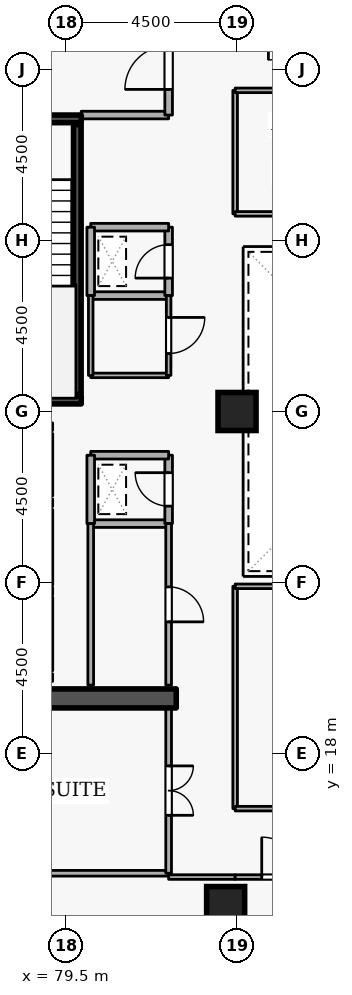
"""IFC4 building model, lengths in metres.
Left out: names, types, materials, properties, quantities, classifications, styles, units other than length and angle.
Written with IfcOpenShell. Run it as: python <this file> out.ifc"""

import sys

from ifc_helpers import new_model, si_unit, direction, frame, frame_2d, origin, origin_2d, place, context, subcontext, project, spatial, rectangle, extrude, element, fill, save


model = new_model("IFC4")
c1 = context("Model", 3, precision=1e-05, world=origin(), true_north=direction((0.0, 1.0)))
c2 = subcontext(c1, "Body", "Model", "MODEL_VIEW")
j1 = project(units=[si_unit("LENGTHUNIT", "METRE"), si_unit("PLANEANGLEUNIT", "RADIAN")], contexts=[c1])
p1 = place(None, origin())
s1 = spatial("IfcSite", under=j1, at=p1, CompositionType="ELEMENT")
p2 = place(p1, origin())
s2 = spatial("IfcBuilding", under=s1, at=p2, CompositionType="ELEMENT")
p3 = place(p2, frame((0.0, 0.0, 236.7)))
s3 = spatial("IfcBuildingStorey", under=s2, at=p3, CompositionType="ELEMENT", Elevation=236.7)
p4 = place(p3, frame((76.6, 19.45, 0.0), z_axis=(0.0, 0.0, 1.0), x_axis=(1.0, 0.0, 0.0)))
e1 = element("IfcWall", 1, at=p4, inside=s3, PredefinedType="SHEAR", context=c2, shape_type="SweptSolid", body=[
    extrude(rectangle(XDim=5.8, YDim=0.5, at=frame_2d((2.9, 0.0))), origin(), (0.0, 0.0, 1.0), 3.6),
])
for number, where, z_axis, x_axis in (
    (2, (83.7, 14.0, 0.0), (0.0, 0.0, 1.0), (1.0, 0.0, 0.0)),
    (3, (84.0, 27.0, 0.0), (0.0, 0.0, 1.0), (1.0, 0.0, 0.0)),
):
    element("IfcColumn", number, at=place(p3, frame(where, z_axis=z_axis, x_axis=x_axis)), inside=s3, PredefinedType="COLUMN", context=c2, shape_type="SweptSolid", body=[
        extrude(rectangle(XDim=1.0, YDim=1.0, at=origin_2d()), origin(), (0.0, 0.0, 1.0), 3.6),
    ])
p5 = place(p3, frame((79.05, 24.78, 0.0), z_axis=(0.0, 0.0, 1.0), x_axis=(0.0, 1.0, 0.0)))
e4 = element("IfcWall", 4, at=p5, inside=s3, PredefinedType="STANDARD", context=c2, shape_type="SweptSolid", body=[
    extrude(rectangle(XDim=1.64, YDim=0.2, at=frame_2d((0.82, 0.0))), origin(), (0.0, 0.0, 1.0), 3.34),
])
p6 = place(p5, frame((0.31, 0.0, 0.0)))
e5 = element("IfcOpeningElement", 5, at=p6, cuts=e4, PredefinedType="OPENING", context=c2, shape_type="SweptSolid", body=[
    extrude(rectangle(XDim=1.02, YDim=2.06, at=frame_2d((0.51, 1.03))), frame((0.0, 0.11, 0.0), z_axis=(0.0, -1.0, 0.0), x_axis=(1.0, 0.0, 0.0)), (0.0, 0.0, 1.0), 0.22),
])
p7 = place(p3, frame((79.05, 22.43, 0.0), z_axis=(0.0, 0.0, 1.0), x_axis=(0.0, 1.0, 0.0)))
e6 = element("IfcWall", 6, at=p7, inside=s3, PredefinedType="STANDARD", context=c2, shape_type="SweptSolid", body=[
    extrude(rectangle(XDim=1.99, YDim=0.2, at=frame_2d((0.995, 0.0))), origin(), (0.0, 0.0, 1.0), 3.34),
])
p8 = place(p7, frame((0.485, 0.0, 0.0)))
e7 = element("IfcOpeningElement", 7, at=p8, cuts=e6, PredefinedType="OPENING", context=c2, shape_type="SweptSolid", body=[
    extrude(rectangle(XDim=1.02, YDim=2.06, at=frame_2d((0.51, 1.03))), frame((0.0, 0.11, 0.0), z_axis=(0.0, -1.0, 0.0), x_axis=(1.0, 0.0, 0.0)), (0.0, 0.0, 1.0), 0.22),
])
p9 = place(p3, frame((79.05, 20.18, 0.0), z_axis=(0.0, 0.0, 1.0), x_axis=(0.0, 1.0, 0.0)))
e8 = element("IfcWall", 8, at=p9, inside=s3, PredefinedType="STANDARD", context=c2, shape_type="SweptSolid", body=[
    extrude(rectangle(XDim=1.94, YDim=0.2, at=frame_2d((0.97, 0.0))), origin(), (0.0, 0.0, 1.0), 3.34),
])
p10 = place(p9, frame((0.46, 0.0, 0.0)))
e9 = element("IfcOpeningElement", 9, at=p10, cuts=e8, PredefinedType="OPENING", context=c2, shape_type="SweptSolid", body=[
    extrude(rectangle(XDim=1.02, YDim=2.06, at=frame_2d((0.51, 1.03))), frame((0.0, 0.11, 0.0), z_axis=(0.0, -1.0, 0.0), x_axis=(1.0, 0.0, 0.0)), (0.0, 0.0, 1.0), 0.22),
])
p11 = place(p3, frame((76.55, 34.7, 0.0), z_axis=(0.0, 0.0, 1.0), x_axis=(1.0, 0.0, 0.0)))
e10 = element("IfcWall", 10, at=p11, inside=s3, PredefinedType="SHEAR", context=c2, shape_type="SweptSolid", body=[
    extrude(rectangle(XDim=3.35, YDim=0.2, at=frame_2d((1.675, 0.0))), origin(), (0.0, 0.0, 1.0), 3.6),
])
p12 = place(p11, frame((1.125, 0.0, 0.0)))
e11 = element("IfcOpeningElement", 11, at=p12, cuts=e10, PredefinedType="OPENING", context=c2, shape_type="SweptSolid", body=[
    extrude(rectangle(XDim=1.1, YDim=2.1, at=frame_2d((0.55, 1.05))), frame((0.0, 0.11, 0.0), z_axis=(0.0, -1.0, 0.0), x_axis=(1.0, 0.0, 0.0)), (0.0, 0.0, 1.0), 0.22),
])
p13 = place(p3, frame((79.9, 27.3, 0.0), z_axis=(0.0, 0.0, 1.0), x_axis=(-1.0, 0.0, 0.0)))
e12 = element("IfcWall", 12, at=p13, inside=s3, PredefinedType="SHEAR", context=c2, shape_type="SweptSolid", body=[
    extrude(rectangle(XDim=3.35, YDim=0.2, at=frame_2d((1.675, 0.0))), origin(), (0.0, 0.0, 1.0), 3.6),
])
p14 = place(p3, frame((79.797, 27.45, 0.0), z_axis=(0.0, 0.0, 1.0), x_axis=(0.0, 1.0, 0.0)))
e13 = element("IfcWall", 13, at=p14, inside=s3, PredefinedType="SHEAR", context=c2, shape_type="SweptSolid", body=[
    extrude(rectangle(XDim=7.1, YDim=0.2, at=frame_2d((3.55, 0.0))), origin(), (0.0, 0.0, 1.0), 3.6),
])
p15 = place(p3, frame((79.9, 34.8, 0.0), z_axis=(0.0, 0.0, 1.0), x_axis=(1.0, 0.0, 0.0)))
e14 = element("IfcWall", 14, at=p15, inside=s3, PredefinedType="STANDARD", context=c2, shape_type="SweptSolid", body=[
    extrude(rectangle(XDim=2.3, YDim=0.2, at=frame_2d((1.15, 0.0))), origin(), (0.0, 0.0, 1.0), 2.545),
])
p16 = place(p3, frame((82.2, 34.8, 0.0), z_axis=(0.0, 0.0, 1.0), x_axis=(0.0, 1.0, 0.0)))
e15 = element("IfcWall", 15, at=p16, inside=s3, PredefinedType="STANDARD", context=c2, shape_type="SweptSolid", body=[
    extrude(rectangle(XDim=2.5, YDim=0.2, at=frame_2d((1.25, 0.0))), origin(), (0.0, 0.0, 1.0), 3.34),
])
p17 = place(p16, frame((0.675, 0.0, 0.0)))
e16 = element("IfcOpeningElement", 16, at=p17, cuts=e15, PredefinedType="OPENING", context=c2, shape_type="SweptSolid", body=[
    extrude(rectangle(XDim=1.15, YDim=2.1, at=frame_2d((0.575, 1.05))), frame((0.0, 0.11, 0.0), z_axis=(0.0, -1.0, 0.0), x_axis=(1.0, 0.0, 0.0)), (0.0, 0.0, 1.0), 0.22),
])
p18 = place(p3, frame((80.15, 24.05, 0.0), z_axis=(0.0, 0.0, 1.0), x_axis=(1.0, 0.0, 0.0)))
e17 = element("IfcWall", 17, at=p18, inside=s3, PredefinedType="STANDARD", context=c2, shape_type="SweptSolid", body=[
    extrude(rectangle(XDim=2.05, YDim=0.2, at=frame_2d((1.025, 0.0))), origin(), (0.0, 0.0, 1.0), 3.34),
])
p19 = place(p3, frame((82.2, 24.05, 0.0), z_axis=(0.0, 0.0, 1.0), x_axis=(0.0, 1.0, 0.0)))
e18 = element("IfcWall", 18, at=p19, inside=s3, PredefinedType="STANDARD", context=c2, shape_type="SweptSolid", body=[
    extrude(rectangle(XDim=1.8, YDim=0.2, at=frame_2d((0.9, 0.0))), origin(), (0.0, 0.0, 1.0), 3.34),
])
p20 = place(p19, frame((0.46, 0.0, 0.0)))
e19 = element("IfcOpeningElement", 19, at=p20, cuts=e18, PredefinedType="OPENING", context=c2, shape_type="SweptSolid", body=[
    extrude(rectangle(XDim=0.88, YDim=2.04, at=frame_2d((0.44, 1.02))), frame((0.0, 0.11, 0.0), z_axis=(0.0, -1.0, 0.0), x_axis=(1.0, 0.0, 0.0)), (0.0, 0.0, 1.0), 0.22),
])
p21 = place(p3, frame((82.2, 25.85, 0.0), z_axis=(0.0, 0.0, 1.0), x_axis=(-1.0, 0.0, 0.0)))
e20 = element("IfcWall", 20, at=p21, inside=s3, PredefinedType="STANDARD", context=c2, shape_type="SweptSolid", body=[
    extrude(rectangle(XDim=2.05, YDim=0.2, at=frame_2d((1.025, 0.0))), origin(), (0.0, 0.0, 1.0), 3.34),
])
p22 = place(p3, frame((80.15, 25.85, 0.0), z_axis=(0.0, 0.0, 1.0), x_axis=(0.0, -1.0, 0.0)))
e21 = element("IfcWall", 21, at=p22, inside=s3, PredefinedType="STANDARD", context=c2, shape_type="SweptSolid", body=[
    extrude(rectangle(XDim=1.8, YDim=0.2, at=frame_2d((0.9, 0.0))), origin(), (0.0, 0.0, 1.0), 3.34),
])
p23 = place(p3, frame((80.15, 30.05, 0.0), z_axis=(0.0, 0.0, 1.0), x_axis=(1.0, 0.0, 0.0)))
e22 = element("IfcWall", 22, at=p23, inside=s3, PredefinedType="STANDARD", context=c2, shape_type="SweptSolid", body=[
    extrude(rectangle(XDim=2.05, YDim=0.2, at=frame_2d((1.025, 0.0))), origin(), (0.0, 0.0, 1.0), 3.34),
])
p24 = place(p3, frame((82.2, 30.05, 0.0), z_axis=(0.0, 0.0, 1.0), x_axis=(0.0, 1.0, 0.0)))
e23 = element("IfcWall", 23, at=p24, inside=s3, PredefinedType="STANDARD", context=c2, shape_type="SweptSolid", body=[
    extrude(rectangle(XDim=1.8, YDim=0.2, at=frame_2d((0.9, 0.0))), origin(), (0.0, 0.0, 1.0), 3.34),
])
p25 = place(p24, frame((0.46, 0.0, 0.0)))
e24 = element("IfcOpeningElement", 24, at=p25, cuts=e23, PredefinedType="OPENING", context=c2, shape_type="SweptSolid", body=[
    extrude(rectangle(XDim=0.88, YDim=2.04, at=frame_2d((0.44, 1.02))), frame((0.0, 0.11, 0.0), z_axis=(0.0, -1.0, 0.0), x_axis=(1.0, 0.0, 0.0)), (0.0, 0.0, 1.0), 0.22),
])
p26 = place(p3, frame((82.2, 31.85, 0.0), z_axis=(0.0, 0.0, 1.0), x_axis=(-1.0, 0.0, 0.0)))
e25 = element("IfcWall", 25, at=p26, inside=s3, PredefinedType="STANDARD", context=c2, shape_type="SweptSolid", body=[
    extrude(rectangle(XDim=2.05, YDim=0.2, at=frame_2d((1.025, 0.0))), origin(), (0.0, 0.0, 1.0), 3.34),
])
p27 = place(p3, frame((80.15, 31.85, 0.0), z_axis=(0.0, 0.0, 1.0), x_axis=(0.0, -1.0, 0.0)))
e26 = element("IfcWall", 26, at=p27, inside=s3, PredefinedType="STANDARD", context=c2, shape_type="SweptSolid", body=[
    extrude(rectangle(XDim=1.8, YDim=0.2, at=frame_2d((0.9, 0.0))), origin(), (0.0, 0.0, 1.0), 3.34),
])
p28 = place(p3, frame((80.15, 19.8, 0.0), z_axis=(0.0, 0.0, 1.0), x_axis=(0.0, 1.0, 0.0)))
e27 = element("IfcWall", 27, at=p28, inside=s3, PredefinedType="PARTITIONING", context=c2, shape_type="SweptSolid", body=[
    extrude(rectangle(XDim=4.25, YDim=0.15, at=frame_2d((2.125, 0.0))), origin(), (0.0, 0.0, 1.0), 3.34),
])
p29 = place(p3, frame((82.2, 24.05, 0.0), z_axis=(0.0, 0.0, 1.0), x_axis=(0.0, -1.0, 0.0)))
e28 = element("IfcWall", 28, at=p29, inside=s3, PredefinedType="PARTITIONING", context=c2, shape_type="SweptSolid", body=[
    extrude(rectangle(XDim=4.25, YDim=0.15, at=frame_2d((2.125, 0.0))), origin(), (0.0, 0.0, 1.0), 3.34),
])
p30 = place(p29, frame((1.665, 0.0, 0.0)))
e29 = element("IfcOpeningElement", 29, at=p30, cuts=e28, PredefinedType="OPENING", context=c2, shape_type="SweptSolid", body=[
    extrude(rectangle(XDim=0.92, YDim=2.08, at=frame_2d((0.46, 1.04))), frame((0.0, 0.085, 0.0), z_axis=(0.0, -1.0, 0.0), x_axis=(1.0, 0.0, 0.0)), (0.0, 0.0, 1.0), 0.17),
])
p31 = place(p3, frame((82.2, 27.95, 0.0), z_axis=(0.0, 0.0, 1.0), x_axis=(-1.0, 0.0, 0.0)))
e30 = element("IfcWall", 30, at=p31, inside=s3, PredefinedType="PARTITIONING", context=c2, shape_type="SweptSolid", body=[
    extrude(rectangle(XDim=2.05, YDim=0.12, at=frame_2d((1.025, 0.0))), origin(), (0.0, 0.0, 1.0), 3.34),
])
p32 = place(p3, frame((80.15, 27.95, 0.0), z_axis=(0.0, 0.0, 1.0), x_axis=(0.0, 1.0, 0.0)))
e31 = element("IfcWall", 31, at=p32, inside=s3, PredefinedType="PARTITIONING", context=c2, shape_type="SweptSolid", body=[
    extrude(rectangle(XDim=2.1, YDim=0.12, at=frame_2d((1.05, 0.0))), origin(), (0.0, 0.0, 1.0), 3.34),
])
p33 = place(p3, frame((82.2, 30.05, 0.0), z_axis=(0.0, 0.0, 1.0), x_axis=(0.0, -1.0, 0.0)))
e32 = element("IfcWall", 32, at=p33, inside=s3, PredefinedType="PARTITIONING", context=c2, shape_type="SweptSolid", body=[
    extrude(rectangle(XDim=2.1, YDim=0.12, at=frame_2d((1.05, 0.0))), origin(), (0.0, 0.0, 1.0), 3.34),
])
p34 = place(p33, frame((0.575, 0.0, 0.0)))
e33 = element("IfcOpeningElement", 33, at=p34, cuts=e32, PredefinedType="OPENING", context=c2, shape_type="SweptSolid", body=[
    extrude(rectangle(XDim=0.95, YDim=2.1, at=frame_2d((0.475, 1.05))), frame((0.0, 0.07, 0.0), z_axis=(0.0, -1.0, 0.0), x_axis=(1.0, 0.0, 0.0)), (0.0, 0.0, 1.0), 0.14),
])
p35 = place(p3, frame((82.2, 14.85, 0.0), z_axis=(0.0, 0.0, 1.0), x_axis=(-1.0, 0.0, 0.0)))
e34 = element("IfcWall", 34, at=p35, inside=s3, PredefinedType="PARTITIONING", context=c2, shape_type="SweptSolid", body=[
    extrude(rectangle(XDim=11.42, YDim=0.15, at=frame_2d((5.71, 0.0))), origin(), (0.0, 0.0, 1.0), 3.34),
])
p36 = place(p3, frame((82.2, 19.2, 0.0), z_axis=(0.0, 0.0, 1.0), x_axis=(0.0, -1.0, 0.0)))
e35 = element("IfcWall", 35, at=p36, inside=s3, PredefinedType="PARTITIONING", context=c2, shape_type="SweptSolid", body=[
    extrude(rectangle(XDim=4.35, YDim=0.15, at=frame_2d((2.175, 0.0))), origin(), (0.0, 0.0, 1.0), 3.34),
])
p37 = place(p36, frame((1.525, 0.0, 0.0)))
e36 = element("IfcOpeningElement", 36, at=p37, cuts=e35, PredefinedType="OPENING", context=c2, shape_type="SweptSolid", body=[
    extrude(rectangle(XDim=1.3, YDim=2.12, at=frame_2d((0.65, 1.06))), frame((0.0, 0.085, 0.0), z_axis=(0.0, -1.0, 0.0), x_axis=(1.0, 0.0, 0.0)), (0.0, 0.0, 1.0), 0.17),
])
p38 = place(p3, frame((82.2, 14.75, 0.0), z_axis=(0.0, 0.0, 1.0), x_axis=(1.0, 0.0, 0.0)))
e37 = element("IfcWall", 37, at=p38, inside=s3, PredefinedType="PARTITIONING", context=c2, shape_type="SweptSolid", body=[
    extrude(rectangle(XDim=1.75, YDim=0.12, at=frame_2d((0.875, 0.0))), origin(), (0.0, 0.0, 1.0), 3.34),
])
p39 = place(p3, frame((83.95, 14.75, 0.0), z_axis=(0.0, 0.0, 1.0), x_axis=(1.0, 0.0, 0.0)))
e38 = element("IfcWall", 38, at=p39, inside=s3, PredefinedType="PARTITIONING", context=c2, shape_type="SweptSolid", body=[
    extrude(rectangle(XDim=2.45, YDim=0.12, at=frame_2d((1.225, 0.0))), origin(), (0.0, 0.0, 1.0), 3.34),
])
p40 = place(p39, frame((0.7, 0.0, 0.0)))
e39 = element("IfcOpeningElement", 39, at=p40, cuts=e38, PredefinedType="OPENING", context=c2, shape_type="SweptSolid", body=[
    extrude(rectangle(XDim=1.05, YDim=2.1, at=frame_2d((0.525, 1.05))), frame((0.0, 0.07, 0.0), z_axis=(0.0, -1.0, 0.0), x_axis=(1.0, 0.0, 0.0)), (0.0, 0.0, 1.0), 0.14),
])
p41 = place(p3, frame((83.95, 16.55, 0.0), z_axis=(0.0, 0.0, 1.0), x_axis=(0.0, 1.0, 0.0)))
e40 = element("IfcWall", 40, at=p41, inside=s3, PredefinedType="PARTITIONING", context=c2, shape_type="SweptSolid", body=[
    extrude(rectangle(XDim=5.85, YDim=0.12, at=frame_2d((2.925, 0.0))), origin(), (0.0, 0.0, 1.0), 3.34),
])
p42 = place(p3, frame((83.95, 22.4, 0.0), z_axis=(0.0, 0.0, 1.0), x_axis=(1.0, 0.0, 0.0)))
e41 = element("IfcWall", 41, at=p42, inside=s3, PredefinedType="PARTITIONING", context=c2, shape_type="SweptSolid", body=[
    extrude(rectangle(XDim=9.1, YDim=0.12, at=frame_2d((4.55, 0.0))), origin(), (0.0, 0.0, 1.0), 3.34),
])
p43 = place(p3, frame((93.05, 16.55, 0.0), z_axis=(0.0, 0.0, 1.0), x_axis=(-1.0, 0.0, 0.0)))
e42 = element("IfcWall", 42, at=p43, inside=s3, PredefinedType="PARTITIONING", context=c2, shape_type="SweptSolid", body=[
    extrude(rectangle(XDim=9.1, YDim=0.12, at=frame_2d((4.55, 0.0))), origin(), (0.0, 0.0, 1.0), 3.34),
])
p44 = place(p43, frame((4.075, 0.0, 0.0)))
e43 = element("IfcOpeningElement", 43, at=p44, cuts=e42, PredefinedType="OPENING", context=c2, shape_type="SweptSolid", body=[
    extrude(rectangle(XDim=0.95, YDim=2.1, at=frame_2d((0.475, 1.05))), frame((0.0, 0.07, 0.0), z_axis=(0.0, -1.0, 0.0), x_axis=(1.0, 0.0, 0.0)), (0.0, 0.0, 1.0), 0.14),
])
p45 = place(p3, frame((83.95, 32.2, 0.0), z_axis=(0.0, 0.0, 1.0), x_axis=(0.0, 1.0, 0.0)))
e44 = element("IfcWall", 44, at=p45, inside=s3, PredefinedType="PARTITIONING", context=c2, shape_type="SweptSolid", body=[
    extrude(rectangle(XDim=3.25, YDim=0.12, at=frame_2d((1.625, 0.0))), origin(), (0.0, 0.0, 1.0), 3.34),
])
p46 = place(p3, frame((83.95, 35.45, 0.0), z_axis=(0.0, 0.0, 1.0), x_axis=(1.0, 0.0, 0.0)))
e45 = element("IfcWall", 45, at=p46, inside=s3, PredefinedType="PARTITIONING", context=c2, shape_type="SweptSolid", body=[
    extrude(rectangle(XDim=9.1, YDim=0.12, at=frame_2d((4.55, 0.0))), origin(), (0.0, 0.0, 1.0), 3.34),
])
p47 = place(p46, frame((4.075, 0.0, 0.0)))
e46 = element("IfcOpeningElement", 46, at=p47, cuts=e45, PredefinedType="OPENING", context=c2, shape_type="SweptSolid", body=[
    extrude(rectangle(XDim=0.95, YDim=2.1, at=frame_2d((0.475, 1.05))), frame((0.0, 0.07, 0.0), z_axis=(0.0, -1.0, 0.0), x_axis=(1.0, 0.0, 0.0)), (0.0, 0.0, 1.0), 0.14),
])
p48 = place(p3, frame((93.05, 32.2, 0.0), z_axis=(0.0, 0.0, 1.0), x_axis=(-1.0, 0.0, 0.0)))
e47 = element("IfcWall", 47, at=p48, inside=s3, PredefinedType="PARTITIONING", context=c2, shape_type="SweptSolid", body=[
    extrude(rectangle(XDim=9.1, YDim=0.12, at=frame_2d((4.55, 0.0))), origin(), (0.0, 0.0, 1.0), 3.34),
])
p49 = place(p17, origin())
e48 = element("IfcDoor", 48, at=p49, inside=s3, OperationType="SINGLE_SWING_LEFT", PredefinedType="DOOR", context=c2, shape_type="SweptSolid", body=[
    extrude(rectangle(XDim=1.15, YDim=2.1, at=frame_2d((0.575, 1.05))), frame((0.0, 0.025, 0.0), z_axis=(0.0, -1.0, 0.0), x_axis=(1.0, 0.0, 0.0)), (0.0, 0.0, 1.0), 0.05),
])
fill(e16, e48)
p50 = place(p20, origin())
e49 = element("IfcDoor", 49, at=p50, inside=s3, OperationType="SINGLE_SWING_RIGHT", PredefinedType="DOOR", context=c2, shape_type="SweptSolid", body=[
    extrude(rectangle(XDim=0.88, YDim=2.04, at=frame_2d((0.44, 1.02))), frame((0.0, 0.025, 0.0), z_axis=(0.0, -1.0, 0.0), x_axis=(1.0, 0.0, 0.0)), (0.0, 0.0, 1.0), 0.05),
])
fill(e19, e49)
p51 = place(p25, origin())
e50 = element("IfcDoor", 50, at=p51, inside=s3, OperationType="SINGLE_SWING_LEFT", PredefinedType="DOOR", context=c2, shape_type="SweptSolid", body=[
    extrude(rectangle(XDim=0.88, YDim=2.04, at=frame_2d((0.44, 1.02))), frame((0.0, 0.025, 0.0), z_axis=(0.0, -1.0, 0.0), x_axis=(1.0, 0.0, 0.0)), (0.0, 0.0, 1.0), 0.05),
])
fill(e24, e50)
p52 = place(p30, origin())
e51 = element("IfcDoor", 51, at=p52, inside=s3, OperationType="SINGLE_SWING_RIGHT", PredefinedType="DOOR", context=c2, shape_type="SweptSolid", body=[
    extrude(rectangle(XDim=0.92, YDim=2.08, at=frame_2d((0.46, 1.04))), frame((0.0, 0.025, 0.0), z_axis=(0.0, -1.0, 0.0), x_axis=(1.0, 0.0, 0.0)), (0.0, 0.0, 1.0), 0.05),
])
fill(e29, e51)
p53 = place(p34, origin())
e52 = element("IfcDoor", 52, at=p53, inside=s3, OperationType="SINGLE_SWING_LEFT", PredefinedType="DOOR", context=c2, shape_type="SweptSolid", body=[
    extrude(rectangle(XDim=0.95, YDim=2.1, at=frame_2d((0.475, 1.05))), frame((0.0, 0.025, 0.0), z_axis=(0.0, -1.0, 0.0), x_axis=(1.0, 0.0, 0.0)), (0.0, 0.0, 1.0), 0.05),
])
fill(e33, e52)
p54 = place(p37, origin())
e53 = element("IfcDoor", 53, at=p54, inside=s3, OperationType="DOUBLE_DOOR_SINGLE_SWING", PredefinedType="DOOR", context=c2, shape_type="SweptSolid", body=[
    extrude(rectangle(XDim=1.3, YDim=2.12, at=frame_2d((0.65, 1.06))), frame((0.0, 0.025, 0.0), z_axis=(0.0, -1.0, 0.0), x_axis=(1.0, 0.0, 0.0)), (0.0, 0.0, 1.0), 0.05),
])
fill(e36, e53)
p55 = place(p40, origin())
e54 = element("IfcDoor", 54, at=p55, inside=s3, OperationType="SINGLE_SWING_LEFT", PredefinedType="DOOR", context=c2, shape_type="SweptSolid", body=[
    extrude(rectangle(XDim=1.05, YDim=2.1, at=frame_2d((0.525, 1.05))), frame((0.0, 0.025, 0.0), z_axis=(0.0, -1.0, 0.0), x_axis=(1.0, 0.0, 0.0)), (0.0, 0.0, 1.0), 0.05),
])
fill(e39, e54)
save(model, sys.argv[1])
